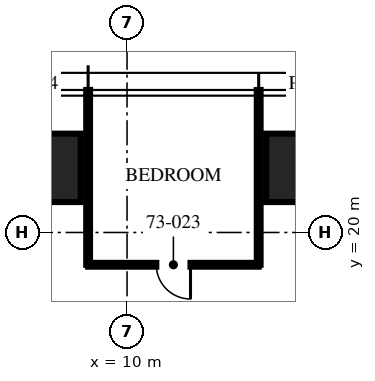
"""IFC4 building model, lengths in metres.
Left out: names, types, materials, properties, quantities, classifications, styles, units other than length and angle.
Written with IfcOpenShell. Run it as: python <this file> out.ifc"""

import sys

from ifc_helpers import new_model, si_unit, direction, frame, frame_2d, origin, origin_2d, place, context, subcontext, project, spatial, rectangle, extrude, element, fill, save


model = new_model("IFC4")
c1 = context("Model", 3, precision=1e-05, world=origin(), true_north=direction((0.0, 1.0)))
c2 = subcontext(c1, "Body", "Model", "MODEL_VIEW")
j1 = project(units=[si_unit("LENGTHUNIT", "METRE"), si_unit("PLANEANGLEUNIT", "RADIAN")], contexts=[c1])
p1 = place(None, origin())
s1 = spatial("IfcSite", under=j1, at=p1, CompositionType="ELEMENT")
p2 = place(p1, origin())
s2 = spatial("IfcBuilding", under=s1, at=p2, CompositionType="ELEMENT")
p3 = place(p2, frame((0.0, 0.0, 293.25)))
s3 = spatial("IfcBuildingStorey", under=s2, at=p3, CompositionType="ELEMENT", Elevation=293.25)
for number, where, z_axis, x_axis in (
    (1, (7.48, 21.7, 0.0), (0.0, 0.0, 1.0), (1.0, 0.0, 0.0)),
    (2, (14.96, 21.7, 0.0), (0.0, 0.0, 1.0), (1.0, 0.0, 0.0)),
):
    element("IfcColumn", number, at=place(p3, frame(where, z_axis=z_axis, x_axis=x_axis)), inside=s3, PredefinedType="COLUMN", context=c2, shape_type="SweptSolid", body=[
        extrude(rectangle(XDim=2.6, YDim=1.8, at=origin_2d()), origin(), (0.0, 0.0, 1.0), 3.75),
    ])
for number, where, z_axis, x_axis in (
    (3, (13.464, 19.15, 0.0), (0.0, 0.0, 1.0), (0.0, 1.0, 0.0)),
    (4, (8.976, 19.15, 0.0), (0.0, 0.0, 1.0), (0.0, 1.0, 0.0)),
):
    element("IfcWall", number, at=place(p3, frame(where, z_axis=z_axis, x_axis=x_axis)), inside=s3, PredefinedType="PARTITIONING", context=c2, shape_type="SweptSolid", body=[
        extrude(rectangle(XDim=4.6, YDim=0.1, at=frame_2d((2.3, 0.0))), origin(), (0.0, 0.0, 1.0), 3.01),
    ])
p4 = place(p3, frame((13.464, 19.15, 0.0), z_axis=(0.0, 0.0, 1.0), x_axis=(-1.0, 0.0, 0.0)))
e5 = element("IfcWall", 5, at=p4, inside=s3, PredefinedType="PARTITIONING", context=c2, shape_type="SweptSolid", body=[
    extrude(rectangle(XDim=4.488, YDim=0.1, at=frame_2d((2.244, 0.0))), origin(), (0.0, 0.0, 1.0), 2.91),
])
p5 = place(p4, frame((1.794, 0.0, 0.0)))
e6 = element("IfcOpeningElement", 6, at=p5, cuts=e5, PredefinedType="OPENING", context=c2, shape_type="SweptSolid", body=[
    extrude(rectangle(XDim=0.9, YDim=2.1, at=frame_2d((0.45, 1.05))), frame((0.0, 0.06, 0.0), z_axis=(0.0, -1.0, 0.0), x_axis=(1.0, 0.0, 0.0)), (0.0, 0.0, 1.0), 0.12),
])
p6 = place(p5, origin())
e7 = element("IfcDoor", 7, at=p6, inside=s3, OperationType="SINGLE_SWING_LEFT", PredefinedType="DOOR", context=c2, shape_type="SweptSolid", body=[
    extrude(rectangle(XDim=0.9, YDim=2.1, at=frame_2d((0.45, 1.05))), frame((0.0, 0.025, 0.0), z_axis=(0.0, -1.0, 0.0), x_axis=(1.0, 0.0, 0.0)), (0.0, 0.0, 1.0), 0.05),
])
fill(e6, e7)
save(model, sys.argv[1])
